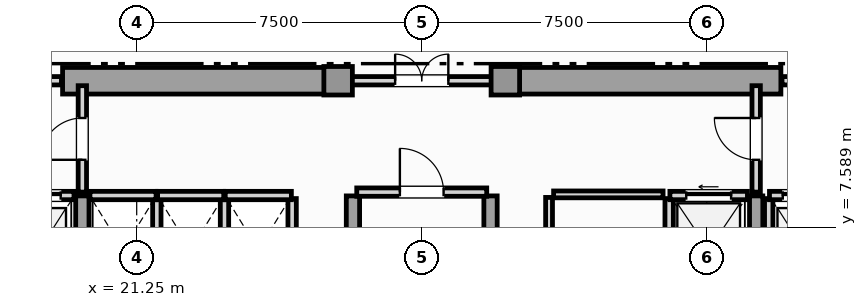
"""IFC4 building model, lengths in metres.
Left out: names, types, materials, properties, quantities, classifications, styles, units other than length and angle.
Written with IfcOpenShell. Run it as: python <this file> out.ifc"""

import sys

from ifc_helpers import new_model, si_unit, direction, frame, frame_2d, origin, origin_2d, place, context, subcontext, project, spatial, rectangle, extrude, element, fill, save


model = new_model("IFC4")
c1 = context("Model", 3, precision=1e-05, world=origin(), true_north=direction((0.0, 1.0)))
c2 = subcontext(c1, "Body", "Model", "MODEL_VIEW")
j1 = project(units=[si_unit("LENGTHUNIT", "METRE"), si_unit("PLANEANGLEUNIT", "RADIAN")], contexts=[c1])
p1 = place(None, origin())
s1 = spatial("IfcSite", under=j1, at=p1, CompositionType="ELEMENT")
p2 = place(p1, origin())
s2 = spatial("IfcBuilding", under=s1, at=p2, CompositionType="ELEMENT")
p3 = place(p2, frame((0.0, 0.0, 149.05)))
s3 = spatial("IfcBuildingStorey", under=s2, at=p3, CompositionType="ELEMENT", Elevation=149.05)
for number, where, z_axis, x_axis in (
    (1, (19.3, 11.45, 0.0), (0.0, 0.0, 1.0), (1.0, 0.0, 0.0)),
    (2, (30.9, 11.45, 0.0), (0.0, 0.0, 1.0), (1.0, 0.0, 0.0)),
):
    element("IfcWall", number, at=place(p3, frame(where, z_axis=z_axis, x_axis=x_axis)), inside=s3, PredefinedType="SHEAR", context=c2, shape_type="SweptSolid", body=[
        extrude(rectangle(XDim=7.3, YDim=0.7, at=frame_2d((3.65, 0.0))), origin(), (0.0, 0.0, 1.0), 3.63),
    ])
for number, where, z_axis, x_axis in (
    (3, (19.82, 0.92, 0.0), (0.0, 0.0, 1.0), (0.0, 1.0, 0.0)),
    (4, (26.94, 0.92, 0.0), (0.0, 0.0, 1.0), (0.0, 1.0, 0.0)),
    (5, (30.56, 0.92, 0.0), (0.0, 0.0, 1.0), (0.0, 1.0, 0.0)),
    (6, (37.55, 0.92, 0.0), (0.0, 0.0, 1.0), (0.0, 1.0, 0.0)),
):
    element("IfcWall", number, at=place(p3, frame(where, z_axis=z_axis, x_axis=x_axis)), inside=s3, PredefinedType="SHEAR", context=c2, shape_type="SweptSolid", body=[
        extrude(rectangle(XDim=7.5, YDim=0.35, at=frame_2d((3.75, 0.0))), origin(), (0.0, 0.0, 1.0), 3.63),
    ])
for number, where, z_axis, x_axis in (
    (7, (26.55, 11.45, 0.0), (0.0, 0.0, 1.0), (1.0, 0.0, 0.0)),
    (8, (30.95, 11.45, 0.0), (0.0, 0.0, 1.0), (1.0, 0.0, 0.0)),
):
    element("IfcColumn", number, at=place(p3, frame(where, z_axis=z_axis, x_axis=x_axis)), inside=s3, PredefinedType="COLUMN", context=c2, shape_type="SweptSolid", body=[
        extrude(rectangle(XDim=0.75, YDim=0.75, at=origin_2d()), origin(), (0.0, 0.0, 1.0), 3.85),
    ])
p4 = place(p3, frame((17.78, 8.43, 0.0), z_axis=(0.0, 0.0, 1.0), x_axis=(1.0, 0.0, 0.0)))
e9 = element("IfcWall", 9, at=p4, inside=s3, PredefinedType="SOLIDWALL", context=c2, shape_type="SweptSolid", body=[
    extrude(rectangle(XDim=1.82, YDim=0.22, at=frame_2d((0.91, 0.0))), origin(), (0.0, 0.0, 1.0), 3.63),
])
p5 = place(p4, frame((0.35, 0.0, 0.0)))
e10 = element("IfcOpeningElement", 10, at=p5, cuts=e9, PredefinedType="OPENING", context=c2, shape_type="SweptSolid", body=[
    extrude(rectangle(XDim=1.12, YDim=2.25, at=frame_2d((0.56, 1.125))), frame((0.0, 0.12, 0.0), z_axis=(0.0, -1.0, 0.0), x_axis=(1.0, 0.0, 0.0)), (0.0, 0.0, 1.0), 0.24),
])
p6 = place(p3, frame((37.88, 5.65, 0.0), z_axis=(0.0, 0.0, 1.0), x_axis=(0.0, 1.0, 0.0)))
e11 = element("IfcWall", 11, at=p6, inside=s3, PredefinedType="SOLIDWALL", context=c2, shape_type="SweptSolid", body=[
    extrude(rectangle(XDim=2.7, YDim=0.22, at=frame_2d((1.35, 0.0))), origin(), (0.0, 0.0, 1.0), 3.63),
])
p7 = place(p3, frame((37.9, 8.43, 0.0), z_axis=(0.0, 0.0, 1.0), x_axis=(1.0, 0.0, 0.0)))
e12 = element("IfcWall", 12, at=p7, inside=s3, PredefinedType="SOLIDWALL", context=c2, shape_type="SweptSolid", body=[
    extrude(rectangle(XDim=1.82, YDim=0.22, at=frame_2d((0.91, 0.0))), origin(), (0.0, 0.0, 1.0), 3.63),
])
p8 = place(p7, frame((0.35, 0.0, 0.0)))
e13 = element("IfcOpeningElement", 13, at=p8, cuts=e12, PredefinedType="OPENING", context=c2, shape_type="SweptSolid", body=[
    extrude(rectangle(XDim=1.12, YDim=2.25, at=frame_2d((0.56, 1.125))), frame((0.0, 0.12, 0.0), z_axis=(0.0, -1.0, 0.0), x_axis=(1.0, 0.0, 0.0)), (0.0, 0.0, 1.0), 0.24),
])
p9 = place(p3, frame((35.26, 5.65, 0.0), z_axis=(0.0, 0.0, 1.0), x_axis=(0.0, 1.0, 0.0)))
e14 = element("IfcWall", 14, at=p9, inside=s3, PredefinedType="SOLIDWALL", context=c2, shape_type="SweptSolid", body=[
    extrude(rectangle(XDim=2.7, YDim=0.22, at=frame_2d((1.35, 0.0))), origin(), (0.0, 0.0, 1.0), 3.63),
])
p10 = place(p3, frame((35.28, 8.43, 0.0), z_axis=(0.0, 0.0, 1.0), x_axis=(1.0, 0.0, 0.0)))
e15 = element("IfcWall", 15, at=p10, inside=s3, PredefinedType="SOLIDWALL", context=c2, shape_type="SweptSolid", body=[
    extrude(rectangle(XDim=2.04, YDim=0.22, at=frame_2d((1.02, 0.0))), origin(), (0.0, 0.0, 1.0), 3.63),
])
p11 = place(p10, frame((0.43, 0.0, 0.0)))
e16 = element("IfcOpeningElement", 16, at=p11, cuts=e15, PredefinedType="OPENING", context=c2, shape_type="SweptSolid", body=[
    extrude(rectangle(XDim=1.18, YDim=2.2, at=frame_2d((0.59, 1.1))), frame((0.0, 0.12, 0.0), z_axis=(0.0, -1.0, 0.0), x_axis=(1.0, 0.0, 0.0)), (0.0, 0.0, 1.0), 0.24),
])
p12 = place(p3, frame((21.78, 5.65, 0.0), z_axis=(0.0, 0.0, 1.0), x_axis=(0.0, 1.0, 0.0)))
e17 = element("IfcWall", 17, at=p12, inside=s3, PredefinedType="SOLIDWALL", context=c2, shape_type="SweptSolid", body=[
    extrude(rectangle(XDim=2.7, YDim=0.22, at=frame_2d((1.35, 0.0))), origin(), (0.0, 0.0, 1.0), 3.63),
])
p13 = place(p3, frame((20.02, 8.43, 0.0), z_axis=(0.0, 0.0, 1.0), x_axis=(1.0, 0.0, 0.0)))
e18 = element("IfcWall", 18, at=p13, inside=s3, PredefinedType="SOLIDWALL", context=c2, shape_type="SweptSolid", body=[
    extrude(rectangle(XDim=1.74, YDim=0.22, at=frame_2d((0.87, 0.0))), origin(), (0.0, 0.0, 1.0), 3.63),
])
p14 = place(p3, frame((23.56, 5.65, 0.0), z_axis=(0.0, 0.0, 1.0), x_axis=(0.0, 1.0, 0.0)))
e19 = element("IfcWall", 19, at=p14, inside=s3, PredefinedType="SOLIDWALL", context=c2, shape_type="SweptSolid", body=[
    extrude(rectangle(XDim=2.7, YDim=0.22, at=frame_2d((1.35, 0.0))), origin(), (0.0, 0.0, 1.0), 3.63),
])
p15 = place(p3, frame((21.8, 8.43, 0.0), z_axis=(0.0, 0.0, 1.0), x_axis=(1.0, 0.0, 0.0)))
e20 = element("IfcWall", 20, at=p15, inside=s3, PredefinedType="SOLIDWALL", context=c2, shape_type="SweptSolid", body=[
    extrude(rectangle(XDim=1.74, YDim=0.22, at=frame_2d((0.87, 0.0))), origin(), (0.0, 0.0, 1.0), 3.63),
])
p16 = place(p3, frame((25.34, 5.65, 0.0), z_axis=(0.0, 0.0, 1.0), x_axis=(0.0, 1.0, 0.0)))
e21 = element("IfcWall", 21, at=p16, inside=s3, PredefinedType="SOLIDWALL", context=c2, shape_type="SweptSolid", body=[
    extrude(rectangle(XDim=2.7, YDim=0.22, at=frame_2d((1.35, 0.0))), origin(), (0.0, 0.0, 1.0), 3.63),
])
p17 = place(p3, frame((23.58, 8.43, 0.0), z_axis=(0.0, 0.0, 1.0), x_axis=(1.0, 0.0, 0.0)))
e22 = element("IfcWall", 22, at=p17, inside=s3, PredefinedType="SOLIDWALL", context=c2, shape_type="SweptSolid", body=[
    extrude(rectangle(XDim=1.74, YDim=0.22, at=frame_2d((0.87, 0.0))), origin(), (0.0, 0.0, 1.0), 3.63),
])
p18 = place(p3, frame((27.04, 8.52, 0.0), z_axis=(0.0, 0.0, 1.0), x_axis=(1.0, 0.0, 0.0)))
e23 = element("IfcWall", 23, at=p18, inside=s3, PredefinedType="SOLIDWALL", context=c2, shape_type="SweptSolid", body=[
    extrude(rectangle(XDim=3.42, YDim=0.22, at=frame_2d((1.71, 0.0))), origin(), (0.0, 0.0, 1.0), 3.63),
])
p19 = place(p18, frame((1.135, 0.0, 0.0)))
e24 = element("IfcOpeningElement", 24, at=p19, cuts=e23, PredefinedType="OPENING", context=c2, shape_type="SweptSolid", body=[
    extrude(rectangle(XDim=1.15, YDim=2.2, at=frame_2d((0.575, 1.1))), frame((0.0, 0.12, 0.0), z_axis=(0.0, -1.0, 0.0), x_axis=(1.0, 0.0, 0.0)), (0.0, 0.0, 1.0), 0.24),
])
p20 = place(p3, frame((19.82, 8.52, 0.0), z_axis=(0.0, 0.0, 1.0), x_axis=(0.0, 1.0, 0.0)))
e25 = element("IfcWall", 25, at=p20, inside=s3, PredefinedType="SOLIDWALL", context=c2, shape_type="SweptSolid", body=[
    extrude(rectangle(XDim=2.8, YDim=0.22, at=frame_2d((1.4, 0.0))), origin(), (0.0, 0.0, 1.0), 3.085),
])
p21 = place(p20, frame((0.85, 0.0, 0.0)))
e26 = element("IfcOpeningElement", 26, at=p21, cuts=e25, PredefinedType="OPENING", context=c2, shape_type="SweptSolid", body=[
    extrude(rectangle(XDim=1.1, YDim=2.2, at=frame_2d((0.55, 1.1))), frame((0.0, 0.12, 0.0), z_axis=(0.0, -1.0, 0.0), x_axis=(1.0, 0.0, 0.0)), (0.0, 0.0, 1.0), 0.24),
])
p22 = place(p3, frame((37.55, 8.52, 0.0), z_axis=(0.0, 0.0, 1.0), x_axis=(0.0, 1.0, 0.0)))
e27 = element("IfcWall", 27, at=p22, inside=s3, PredefinedType="SOLIDWALL", context=c2, shape_type="SweptSolid", body=[
    extrude(rectangle(XDim=2.8, YDim=0.22, at=frame_2d((1.4, 0.0))), origin(), (0.0, 0.0, 1.0), 3.085),
])
p23 = place(p22, frame((0.85, 0.0, 0.0)))
e28 = element("IfcOpeningElement", 28, at=p23, cuts=e27, PredefinedType="OPENING", context=c2, shape_type="SweptSolid", body=[
    extrude(rectangle(XDim=1.1, YDim=2.2, at=frame_2d((0.55, 1.1))), frame((0.0, 0.12, 0.0), z_axis=(0.0, -1.0, 0.0), x_axis=(1.0, 0.0, 0.0)), (0.0, 0.0, 1.0), 0.24),
])
p24 = place(p3, frame((16.23, 11.45, 0.0), z_axis=(0.0, 0.0, 1.0), x_axis=(1.0, 0.0, 0.0)))
e29 = element("IfcWall", 29, at=p24, inside=s3, PredefinedType="SOLIDWALL", context=c2, shape_type="SweptSolid", body=[
    extrude(rectangle(XDim=3.04, YDim=0.22, at=frame_2d((1.52, 0.0))), origin(), (0.0, 0.0, 1.0), 3.63),
])
p25 = place(p24, frame((0.97, 0.0, 0.0)))
e30 = element("IfcOpeningElement", 30, at=p25, cuts=e29, PredefinedType="OPENING", context=c2, shape_type="SweptSolid", body=[
    extrude(rectangle(XDim=1.1, YDim=2.2, at=frame_2d((0.55, 1.1))), frame((0.0, 0.12, 0.0), z_axis=(0.0, -1.0, 0.0), x_axis=(1.0, 0.0, 0.0)), (0.0, 0.0, 1.0), 0.24),
])
p26 = place(p3, frame((26.63, 11.45, 0.0), z_axis=(0.0, 0.0, 1.0), x_axis=(1.0, 0.0, 0.0)))
e31 = element("IfcWall", 31, at=p26, inside=s3, PredefinedType="SOLIDWALL", context=c2, shape_type="SweptSolid", body=[
    extrude(rectangle(XDim=4.24, YDim=0.22, at=frame_2d((2.12, 0.0))), origin(), (0.0, 0.0, 1.0), 3.63),
])
p27 = place(p26, frame((1.42, 0.0, 0.0)))
e32 = element("IfcOpeningElement", 32, at=p27, cuts=e31, PredefinedType="OPENING", context=c2, shape_type="SweptSolid", body=[
    extrude(rectangle(XDim=1.4, YDim=2.2, at=frame_2d((0.7, 1.1))), frame((0.0, 0.12, 0.0), z_axis=(0.0, -1.0, 0.0), x_axis=(1.0, 0.0, 0.0)), (0.0, 0.0, 1.0), 0.24),
])
p28 = place(p3, frame((38.23, 11.45, 0.0), z_axis=(0.0, 0.0, 1.0), x_axis=(1.0, 0.0, 0.0)))
e33 = element("IfcWall", 33, at=p28, inside=s3, PredefinedType="SOLIDWALL", context=c2, shape_type="SweptSolid", body=[
    extrude(rectangle(XDim=3.04, YDim=0.22, at=frame_2d((1.52, 0.0))), origin(), (0.0, 0.0, 1.0), 3.63),
])
p29 = place(p28, frame((0.97, 0.0, 0.0)))
e34 = element("IfcOpeningElement", 34, at=p29, cuts=e33, PredefinedType="OPENING", context=c2, shape_type="SweptSolid", body=[
    extrude(rectangle(XDim=1.1, YDim=2.2, at=frame_2d((0.55, 1.1))), frame((0.0, 0.12, 0.0), z_axis=(0.0, -1.0, 0.0), x_axis=(1.0, 0.0, 0.0)), (0.0, 0.0, 1.0), 0.24),
])
p30 = place(p3, frame((32.1, 5.65, 0.0), z_axis=(0.0, 0.0, 1.0), x_axis=(0.0, 1.0, 0.0)))
e35 = element("IfcWall", 35, at=p30, inside=s3, PredefinedType="PARTITIONING", context=c2, shape_type="SweptSolid", body=[
    extrude(rectangle(XDim=2.73, YDim=0.18, at=frame_2d((1.365, 0.0))), origin(), (0.0, 0.0, 1.0), 3.63),
])
p31 = place(p30, frame((0.84, 0.0, 0.0)))
e36 = element("IfcOpeningElement", 36, at=p31, cuts=e35, PredefinedType="OPENING", context=c2, shape_type="SweptSolid", body=[
    extrude(rectangle(XDim=1.05, YDim=2.15, at=frame_2d((0.525, 1.075))), frame((0.0, 0.1, 0.0), z_axis=(0.0, -1.0, 0.0), x_axis=(1.0, 0.0, 0.0)), (0.0, 0.0, 1.0), 0.2),
])
p32 = place(p3, frame((32.22, 8.46, 0.0), z_axis=(0.0, 0.0, 1.0), x_axis=(1.0, 0.0, 0.0)))
e37 = element("IfcWall", 37, at=p32, inside=s3, PredefinedType="PARTITIONING", context=c2, shape_type="SweptSolid", body=[
    extrude(rectangle(XDim=2.88, YDim=0.18, at=frame_2d((1.44, 0.0))), origin(), (0.0, 0.0, 1.0), 3.63),
])
p33 = place(p5, origin())
e38 = element("IfcDoor", 38, at=p33, inside=s3, OperationType="SLIDING_TO_LEFT", PredefinedType="DOOR", context=c2, shape_type="SweptSolid", body=[
    extrude(rectangle(XDim=1.12, YDim=2.25, at=frame_2d((0.56, 1.125))), frame((0.0, 0.025, 0.0), z_axis=(0.0, -1.0, 0.0), x_axis=(1.0, 0.0, 0.0)), (0.0, 0.0, 1.0), 0.05),
])
fill(e10, e38)
p34 = place(p8, origin())
e39 = element("IfcDoor", 39, at=p34, inside=s3, OperationType="SLIDING_TO_RIGHT", PredefinedType="DOOR", context=c2, shape_type="SweptSolid", body=[
    extrude(rectangle(XDim=1.12, YDim=2.25, at=frame_2d((0.56, 1.125))), frame((0.0, 0.025, 0.0), z_axis=(0.0, -1.0, 0.0), x_axis=(1.0, 0.0, 0.0)), (0.0, 0.0, 1.0), 0.05),
])
fill(e13, e39)
p35 = place(p11, origin())
e40 = element("IfcDoor", 40, at=p35, inside=s3, OperationType="SLIDING_TO_LEFT", PredefinedType="DOOR", context=c2, shape_type="SweptSolid", body=[
    extrude(rectangle(XDim=1.18, YDim=2.2, at=frame_2d((0.59, 1.1))), frame((0.0, 0.025, 0.0), z_axis=(0.0, -1.0, 0.0), x_axis=(1.0, 0.0, 0.0)), (0.0, 0.0, 1.0), 0.05),
])
fill(e16, e40)
p36 = place(p19, origin())
e41 = element("IfcDoor", 41, at=p36, inside=s3, OperationType="SINGLE_SWING_LEFT", PredefinedType="DOOR", context=c2, shape_type="SweptSolid", body=[
    extrude(rectangle(XDim=1.15, YDim=2.2, at=frame_2d((0.575, 1.1))), frame((0.0, 0.025, 0.0), z_axis=(0.0, -1.0, 0.0), x_axis=(1.0, 0.0, 0.0)), (0.0, 0.0, 1.0), 0.05),
])
fill(e24, e41)
p37 = place(p21, origin())
e42 = element("IfcDoor", 42, at=p37, inside=s3, OperationType="SINGLE_SWING_LEFT", PredefinedType="DOOR", context=c2, shape_type="SweptSolid", body=[
    extrude(rectangle(XDim=1.1, YDim=2.2, at=frame_2d((0.55, 1.1))), frame((0.0, 0.025, 0.0), z_axis=(0.0, -1.0, 0.0), x_axis=(1.0, 0.0, 0.0)), (0.0, 0.0, 1.0), 0.05),
])
fill(e26, e42)
p38 = place(p23, origin())
e43 = element("IfcDoor", 43, at=p38, inside=s3, OperationType="SINGLE_SWING_RIGHT", PredefinedType="DOOR", context=c2, shape_type="SweptSolid", body=[
    extrude(rectangle(XDim=1.1, YDim=2.2, at=frame_2d((0.55, 1.1))), frame((0.0, 0.025, 0.0), z_axis=(0.0, -1.0, 0.0), x_axis=(1.0, 0.0, 0.0)), (0.0, 0.0, 1.0), 0.05),
])
fill(e28, e43)
p39 = place(p27, origin())
e44 = element("IfcDoor", 44, at=p39, inside=s3, OperationType="DOUBLE_DOOR_SINGLE_SWING", PredefinedType="DOOR", context=c2, shape_type="SweptSolid", body=[
    extrude(rectangle(XDim=1.4, YDim=2.2, at=frame_2d((0.7, 1.1))), frame((0.0, 0.025, 0.0), z_axis=(0.0, -1.0, 0.0), x_axis=(1.0, 0.0, 0.0)), (0.0, 0.0, 1.0), 0.05),
])
fill(e32, e44)
save(model, sys.argv[1])
